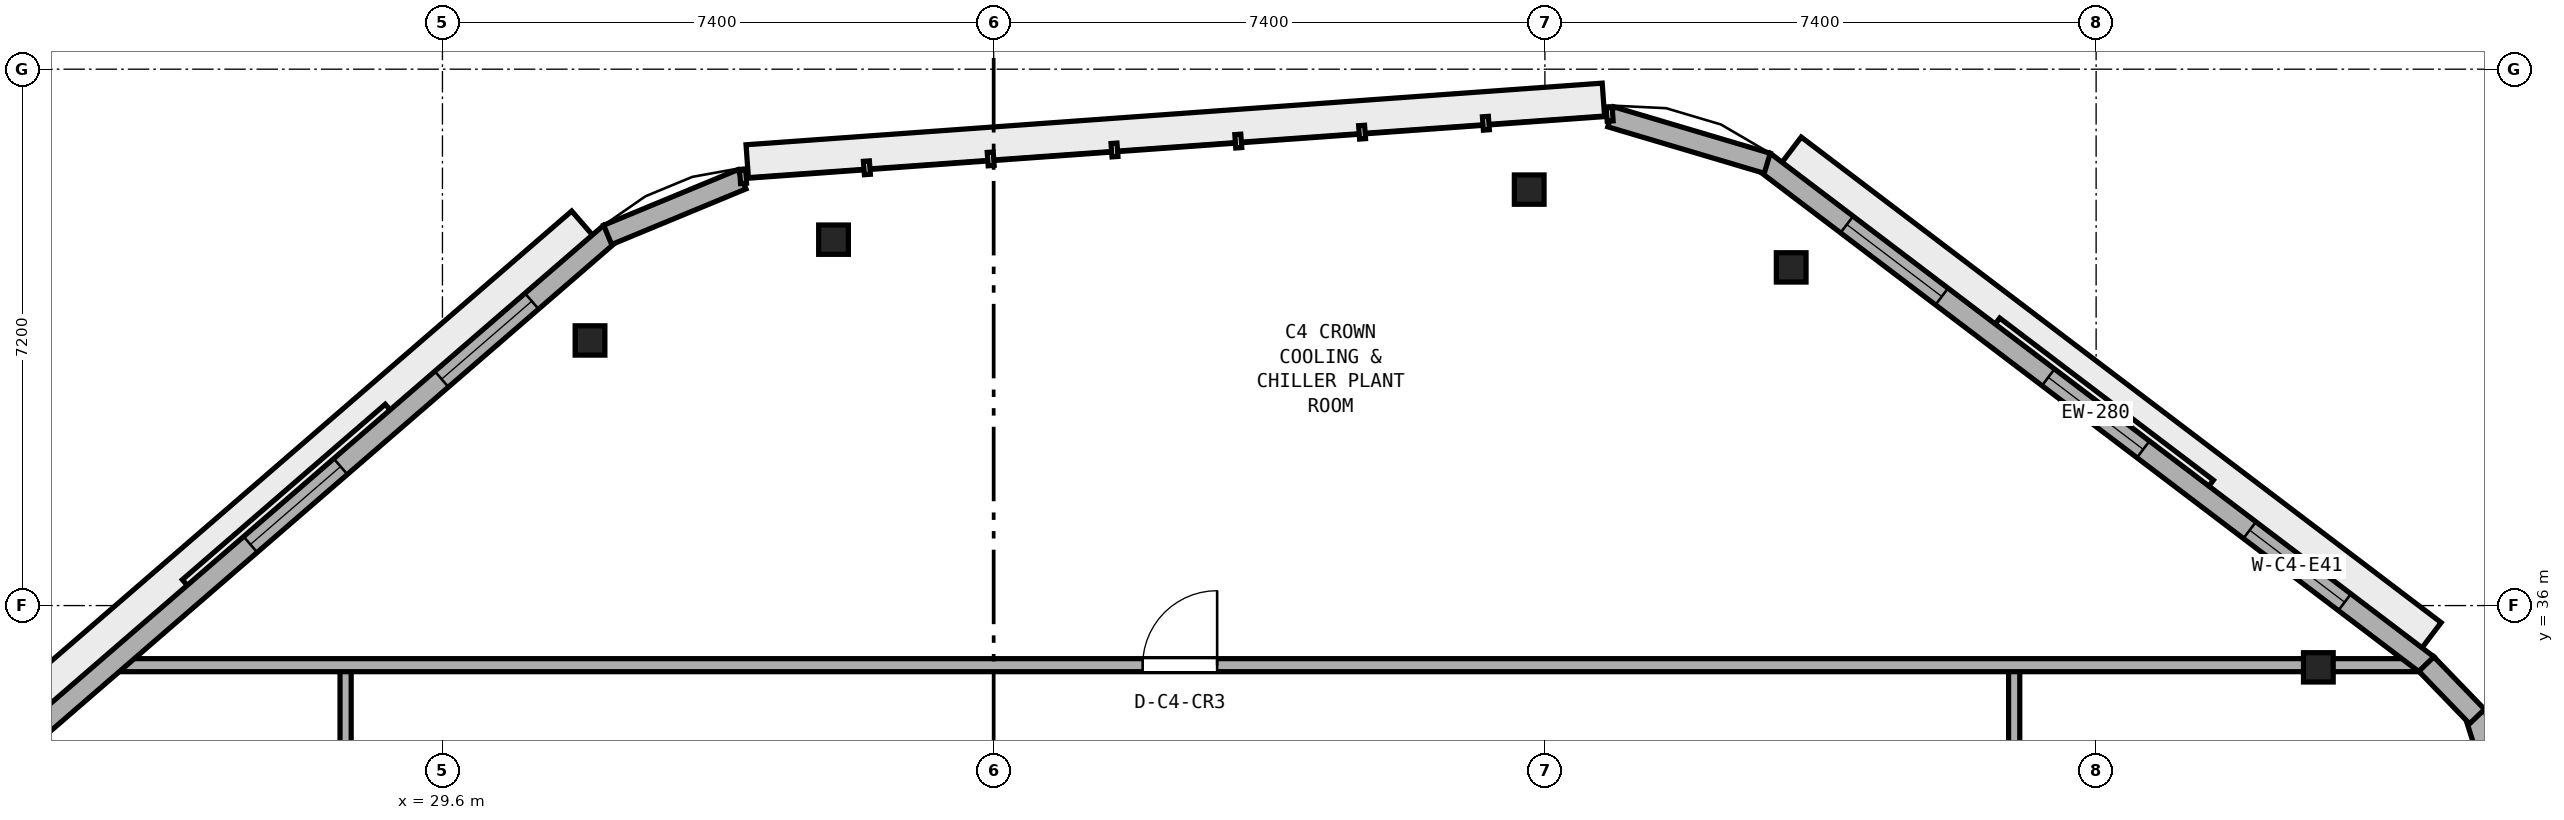
"""IFC4 building model, lengths in metres.
Left out: names, types, materials, properties, quantities, classifications, styles, units other than length and angle.
Written with IfcOpenShell. Run it as: python <this file> out.ifc"""

import sys

from ifc_helpers import new_model, si_unit, direction, frame, frame_2d, origin, origin_2d, place, context, subcontext, project, spatial, rectangle, i_section, extrude, element, fill, save


model = new_model("IFC4")
c1 = context("Model", 3, precision=1e-05, world=origin(), true_north=direction((0.0, 1.0)))
c2 = subcontext(c1, "Body", "Model", "MODEL_VIEW")
j1 = project(units=[si_unit("LENGTHUNIT", "METRE"), si_unit("PLANEANGLEUNIT", "RADIAN")], contexts=[c1])
p1 = place(None, origin())
s1 = spatial("IfcSite", under=j1, at=p1, CompositionType="ELEMENT")
p2 = place(p1, origin())
s2 = spatial("IfcBuilding", under=s1, at=p2, CompositionType="ELEMENT")
p3 = place(p2, frame((0.0, 0.0, 325.4)))
s3 = spatial("IfcBuildingStorey", under=s2, at=p3, CompositionType="ELEMENT", Elevation=325.4)
for number, where, z_axis, x_axis in (
    (1, (54.783, 35.171, 0.0), (0.0, 0.0, 1.0), (1.0, 0.0, 0.0)),
    (2, (47.706, 40.54, 0.0), (0.0, 0.0, 1.0), (1.0, 0.0, 0.0)),
    (3, (44.189, 41.583, 0.0), (0.0, 0.0, 1.0), (1.0, 0.0, 0.0)),
    (4, (34.85, 40.912, 0.0), (0.0, 0.0, 1.0), (1.0, 0.0, 0.0)),
    (5, (31.581, 39.559, 0.0), (0.0, 0.0, 1.0), (1.0, 0.0, 0.0)),
):
    element("IfcColumn", number, at=place(p3, frame(where, z_axis=z_axis, x_axis=x_axis)), inside=s3, PredefinedType="COLUMN", context=c2, shape_type="SweptSolid", body=[
        extrude(i_section(OverallWidth=0.399, OverallDepth=0.394, WebThickness=0.023, FlangeThickness=0.037, at=origin_2d()), origin(), (0.0, 0.0, 1.0), 4.0),
    ])
p4 = place(p3, frame((50.7, 15.2, 0.0), z_axis=(0.0, 0.0, 1.0), x_axis=(0.0, 1.0, 0.0)))
e6 = element("IfcWall", 6, at=p4, inside=s3, PredefinedType="PARTITIONING", context=c2, shape_type="SweptSolid", body=[
    extrude(rectangle(XDim=20.0, YDim=0.15, at=frame_2d((10.0, 0.0))), origin(), (0.0, 0.0, 1.0), 3.72),
])
p5 = place(p4, frame((9.5, 0.0, 0.0)))
e7 = element("IfcOpeningElement", 7, at=p5, cuts=e6, PredefinedType="OPENING", context=c2, shape_type="SweptSolid", body=[
    extrude(rectangle(XDim=1.0, YDim=2.12, at=frame_2d((0.5, 1.06))), frame((0.0, 0.085, 0.0), z_axis=(0.0, -1.0, 0.0), x_axis=(1.0, 0.0, 0.0)), (0.0, 0.0, 1.0), 0.17),
])
p6 = place(p3, frame((28.3, 15.2, 0.0), z_axis=(0.0, 0.0, 1.0), x_axis=(0.0, 1.0, 0.0)))
e8 = element("IfcWall", 8, at=p6, inside=s3, PredefinedType="PARTITIONING", context=c2, shape_type="SweptSolid", body=[
    extrude(rectangle(XDim=20.0, YDim=0.15, at=frame_2d((10.0, 0.0))), origin(), (0.0, 0.0, 1.0), 2.37),
])
p7 = place(p6, frame((9.5, 0.0, 0.0)))
e9 = element("IfcOpeningElement", 9, at=p7, cuts=e8, PredefinedType="OPENING", context=c2, shape_type="SweptSolid", body=[
    extrude(rectangle(XDim=1.0, YDim=2.12, at=frame_2d((0.5, 1.06))), frame((0.0, 0.085, 0.0), z_axis=(0.0, -1.0, 0.0), x_axis=(1.0, 0.0, 0.0)), (0.0, 0.0, 1.0), 0.17),
])
p8 = place(p3, frame((25.074, 35.2, 0.0), z_axis=(0.0, 0.0, 1.0), x_axis=(1.0, 0.0, 0.0)))
e10 = element("IfcWall", 10, at=p8, inside=s3, PredefinedType="PARTITIONING", context=c2, shape_type="SweptSolid", body=[
    extrude(rectangle(XDim=31.228, YDim=0.175, at=frame_2d((15.614, 0.0))), origin(), (0.0, 0.0, 1.0), 3.72),
])
p9 = place(p8, frame((13.926, 0.0, 0.0)))
e11 = element("IfcOpeningElement", 11, at=p9, cuts=e10, PredefinedType="OPENING", context=c2, shape_type="SweptSolid", body=[
    extrude(rectangle(XDim=1.0, YDim=2.12, at=frame_2d((0.5, 1.06))), frame((0.0, 0.097, 0.0), z_axis=(0.0, -1.0, 0.0), x_axis=(1.0, 0.0, 0.0)), (0.0, 0.0, 1.0), 0.195),
])
p10 = place(p3, frame((56.25, 35.201, 0.0), z_axis=(0.0, 0.0, 1.0), x_axis=(-0.796694895732, 0.60438170316, 0.0)))
e12 = element("IfcWall", 12, at=p10, inside=s3, PredefinedType="STANDARD", context=c2, shape_type="SweptSolid", body=[
    extrude(rectangle(XDim=11.183, YDim=0.28, at=frame_2d((5.591, 0.0))), origin(), (0.0, 0.0, 1.0), 3.72),
])
p11 = place(p10, frame((1.397, 0.0, 0.9)))
e13 = element("IfcOpeningElement", 13, at=p11, cuts=e12, PredefinedType="OPENING", context=c2, shape_type="SweptSolid", body=[
    extrude(rectangle(XDim=1.6, YDim=1.45, at=frame_2d((0.8, 0.725))), frame((0.0, 0.15, 0.0), z_axis=(0.0, -1.0, 0.0), x_axis=(1.0, 0.0, 0.0)), (0.0, 0.0, 1.0), 0.3),
])
p12 = place(p10, frame((4.792, 0.0, 0.9)))
e14 = element("IfcOpeningElement", 14, at=p12, cuts=e12, PredefinedType="OPENING", context=c2, shape_type="SweptSolid", body=[
    extrude(rectangle(XDim=1.6, YDim=1.45, at=frame_2d((0.8, 0.725))), frame((0.0, 0.15, 0.0), z_axis=(0.0, -1.0, 0.0), x_axis=(1.0, 0.0, 0.0)), (0.0, 0.0, 1.0), 0.3),
])
p13 = place(p10, frame((8.186, 0.0, 0.9)))
e15 = element("IfcOpeningElement", 15, at=p13, cuts=e12, PredefinedType="OPENING", context=c2, shape_type="SweptSolid", body=[
    extrude(rectangle(XDim=1.6, YDim=1.45, at=frame_2d((0.8, 0.725))), frame((0.0, 0.15, 0.0), z_axis=(0.0, -1.0, 0.0), x_axis=(1.0, 0.0, 0.0)), (0.0, 0.0, 1.0), 0.3),
])
p14 = place(p3, frame((31.856, 40.999, 0.0), z_axis=(0.0, 0.0, 1.0), x_axis=(-0.756468872678, -0.654029697085, 0.0)))
e16 = element("IfcWall", 16, at=p14, inside=s3, PredefinedType="STANDARD", context=c2, shape_type="SweptSolid", body=[
    extrude(rectangle(XDim=11.18, YDim=0.28, at=frame_2d((5.59, 0.0))), origin(), (0.0, 0.0, 1.0), 3.72),
])
p15 = place(p14, frame((1.397, 0.0, 0.9)))
e17 = element("IfcOpeningElement", 17, at=p15, cuts=e16, PredefinedType="OPENING", context=c2, shape_type="SweptSolid", body=[
    extrude(rectangle(XDim=1.6, YDim=1.45, at=frame_2d((0.8, 0.725))), frame((0.0, 0.15, 0.0), z_axis=(0.0, -1.0, 0.0), x_axis=(1.0, 0.0, 0.0)), (0.0, 0.0, 1.0), 0.3),
])
p16 = place(p14, frame((4.79, 0.0, 0.9)))
e18 = element("IfcOpeningElement", 18, at=p16, cuts=e16, PredefinedType="OPENING", context=c2, shape_type="SweptSolid", body=[
    extrude(rectangle(XDim=1.6, YDim=1.45, at=frame_2d((0.8, 0.725))), frame((0.0, 0.15, 0.0), z_axis=(0.0, -1.0, 0.0), x_axis=(1.0, 0.0, 0.0)), (0.0, 0.0, 1.0), 0.3),
])
p17 = place(p3, frame((57.447, 32.783, 0.0), z_axis=(0.0, 0.0, 1.0), x_axis=(-0.302530200683, 0.953139799649, 0.0)))
e19 = element("IfcWall", 19, at=p17, inside=s3, PredefinedType="STANDARD", context=c2, shape_type="SweptSolid", body=[
    extrude(rectangle(XDim=1.871, YDim=0.28, at=frame_2d((0.935, 0.0))), origin(), (0.0, 0.0, 1.0), 3.72),
])
p18 = place(p3, frame((56.914, 34.511, 0.0), z_axis=(0.0, 0.0, 1.0), x_axis=(-0.694785794461, 0.719216726595, 0.0)))
e20 = element("IfcWall", 20, at=p18, inside=s3, PredefinedType="STANDARD", context=c2, shape_type="SweptSolid", body=[
    extrude(rectangle(XDim=0.979, YDim=0.28, at=frame_2d((0.49, 0.0))), origin(), (0.0, 0.0, 1.0), 3.72),
])
p19 = place(p3, frame((47.385, 41.937, 0.0), z_axis=(0.0, 0.0, 1.0), x_axis=(-0.958653038593, 0.284577496643, 0.0)))
e21 = element("IfcWall", 21, at=p19, inside=s3, PredefinedType="STANDARD", context=c2, shape_type="SweptSolid", body=[
    extrude(rectangle(XDim=2.192, YDim=0.28, at=frame_2d((1.096, 0.0))), origin(), (0.0, 0.0, 1.0), 3.72),
])
p20 = place(p3, frame((33.621, 41.722, 0.0), z_axis=(0.0, 0.0, 1.0), x_axis=(-0.923984824036, -0.382429137162, 0.0)))
e22 = element("IfcWall", 22, at=p20, inside=s3, PredefinedType="STANDARD", context=c2, shape_type="SweptSolid", body=[
    extrude(rectangle(XDim=1.952, YDim=0.28, at=frame_2d((0.976, 0.0))), origin(), (0.0, 0.0, 1.0), 3.72),
])
p21 = place(p9, origin())
e23 = element("IfcDoor", 23, at=p21, inside=s3, OperationType="SINGLE_SWING_RIGHT", PredefinedType="DOOR", context=c2, shape_type="SweptSolid", body=[
    extrude(rectangle(XDim=1.0, YDim=2.12, at=frame_2d((0.5, 1.06))), frame((0.0, 0.025, 0.0), z_axis=(0.0, -1.0, 0.0), x_axis=(1.0, 0.0, 0.0)), (0.0, 0.0, 1.0), 0.05),
])
fill(e11, e23)
p22 = place(p11, origin())
e24 = element("IfcWindow", 24, at=p22, inside=s3, PartitioningType="SINGLE_PANEL", PredefinedType="WINDOW", context=c2, shape_type="SweptSolid", body=[
    extrude(rectangle(XDim=1.6, YDim=1.45, at=frame_2d((0.8, 0.725))), frame((0.0, 0.03, 0.0), z_axis=(0.0, -1.0, 0.0), x_axis=(1.0, 0.0, 0.0)), (0.0, 0.0, 1.0), 0.06),
])
fill(e13, e24)
p23 = place(p12, origin())
e25 = element("IfcWindow", 25, at=p23, inside=s3, PartitioningType="SINGLE_PANEL", PredefinedType="WINDOW", context=c2, shape_type="SweptSolid", body=[
    extrude(rectangle(XDim=1.6, YDim=1.45, at=frame_2d((0.8, 0.725))), frame((0.0, 0.03, 0.0), z_axis=(0.0, -1.0, 0.0), x_axis=(1.0, 0.0, 0.0)), (0.0, 0.0, 1.0), 0.06),
])
fill(e14, e25)
p24 = place(p13, origin())
e26 = element("IfcWindow", 26, at=p24, inside=s3, PartitioningType="SINGLE_PANEL", PredefinedType="WINDOW", context=c2, shape_type="SweptSolid", body=[
    extrude(rectangle(XDim=1.6, YDim=1.45, at=frame_2d((0.8, 0.725))), frame((0.0, 0.03, 0.0), z_axis=(0.0, -1.0, 0.0), x_axis=(1.0, 0.0, 0.0)), (0.0, 0.0, 1.0), 0.06),
])
fill(e15, e26)
p25 = place(p15, origin())
e27 = element("IfcWindow", 27, at=p25, inside=s3, PartitioningType="SINGLE_PANEL", PredefinedType="WINDOW", context=c2, shape_type="SweptSolid", body=[
    extrude(rectangle(XDim=1.6, YDim=1.45, at=frame_2d((0.8, 0.725))), frame((0.0, 0.03, 0.0), z_axis=(0.0, -1.0, 0.0), x_axis=(1.0, 0.0, 0.0)), (0.0, 0.0, 1.0), 0.06),
])
fill(e17, e27)
p26 = place(p16, origin())
e28 = element("IfcWindow", 28, at=p26, inside=s3, PartitioningType="SINGLE_PANEL", PredefinedType="WINDOW", context=c2, shape_type="SweptSolid", body=[
    extrude(rectangle(XDim=1.6, YDim=1.45, at=frame_2d((0.8, 0.725))), frame((0.0, 0.03, 0.0), z_axis=(0.0, -1.0, 0.0), x_axis=(1.0, 0.0, 0.0)), (0.0, 0.0, 1.0), 0.06),
])
fill(e18, e28)
save(model, sys.argv[1])
